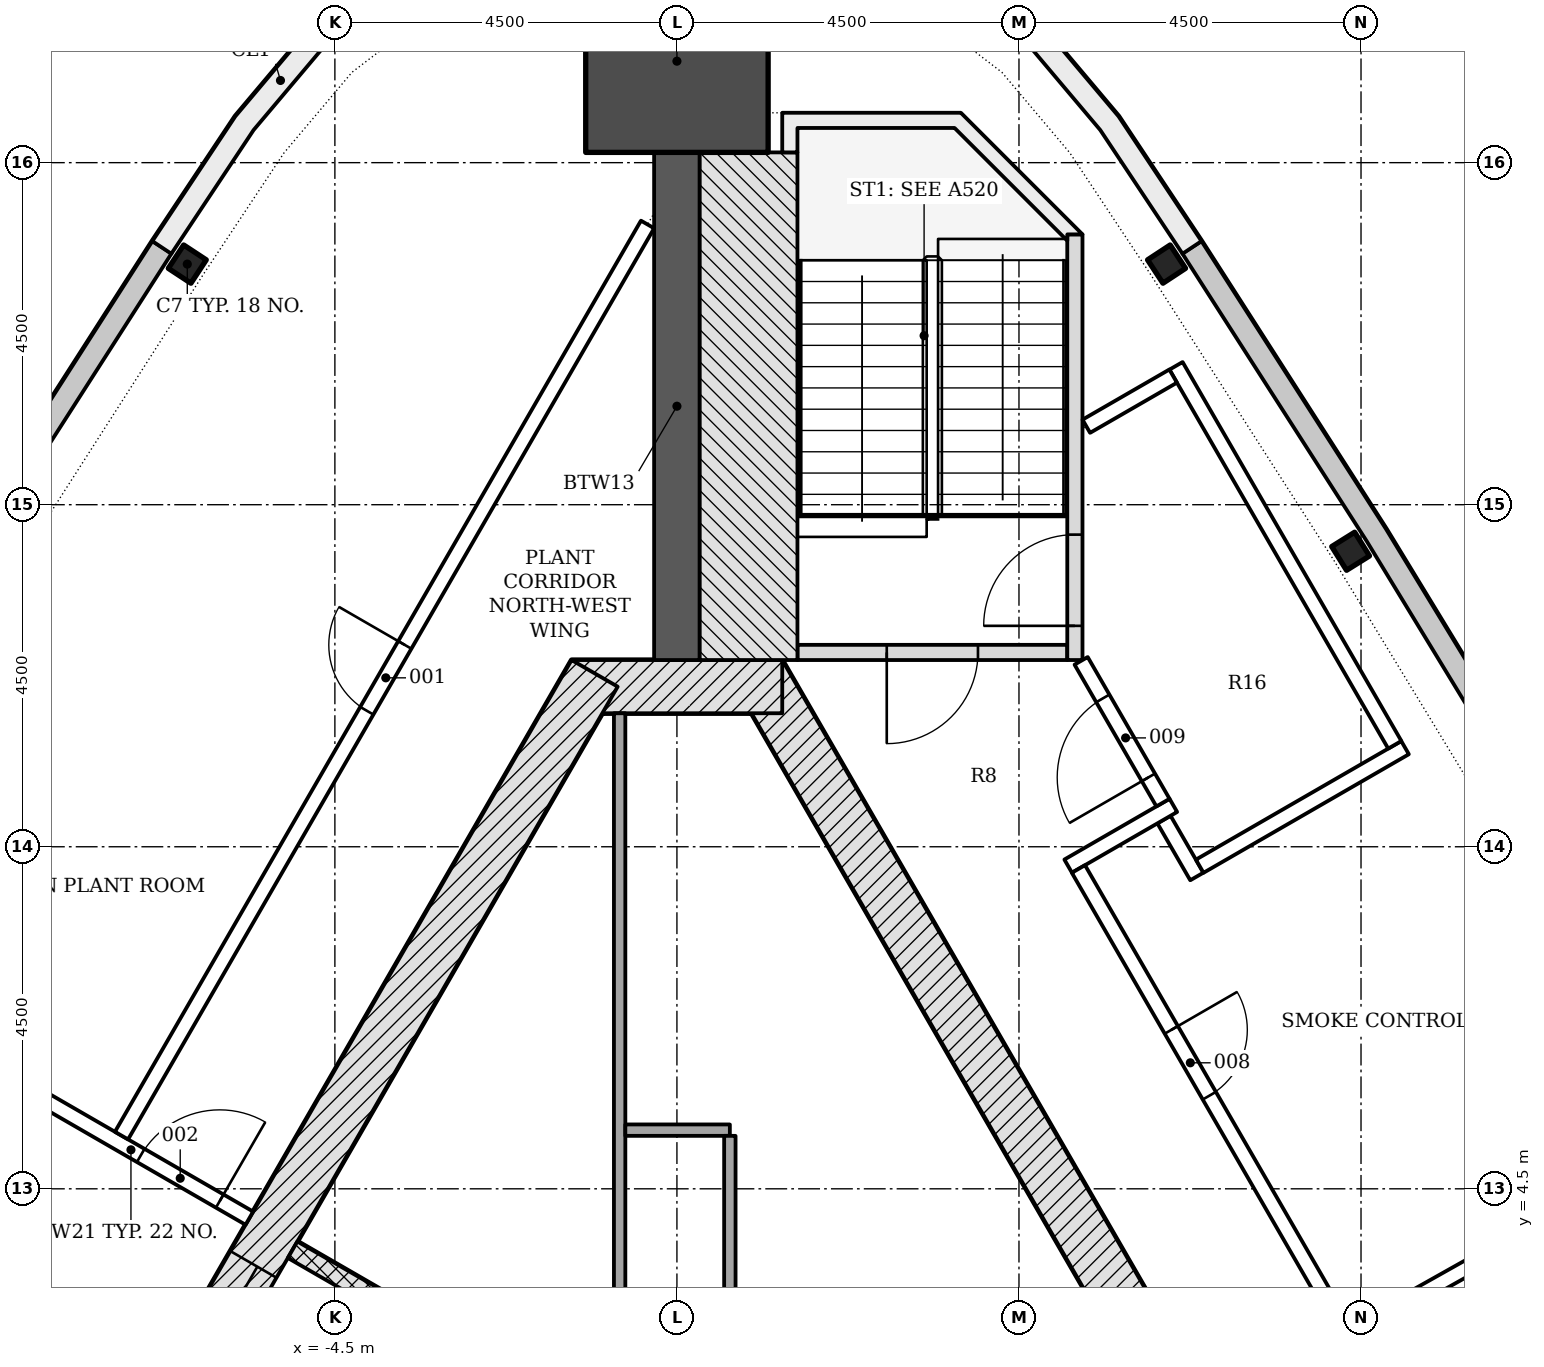
"""IFC4 building model, lengths in metres.
Left out: names, types, materials, properties, quantities, classifications, styles, units other than length and angle.
Written with IfcOpenShell. Run it as: python <this file> out.ifc"""

import sys

from ifc_helpers import new_model, si_unit, direction, frame, frame_2d, origin, origin_2d, place, context, subcontext, project, spatial, polyline, rectangle, i_section, outline, extrude, element, fill, save


model = new_model("IFC4")
c1 = context("Model", 3, precision=1e-05, world=origin(), true_north=direction((0.0, 1.0)))
c2 = subcontext(c1, "Body", "Model", "MODEL_VIEW")
j1 = project(units=[si_unit("LENGTHUNIT", "METRE"), si_unit("PLANEANGLEUNIT", "RADIAN")], contexts=[c1])
p1 = place(None, origin())
s1 = spatial("IfcSite", under=j1, at=p1, CompositionType="ELEMENT")
p2 = place(p1, origin())
s2 = spatial("IfcBuilding", under=s1, at=p2, CompositionType="ELEMENT")
p3 = place(p2, frame((0.0, 0.0, 297.6)))
s3 = spatial("IfcBuildingStorey", under=s2, at=p3, CompositionType="ELEMENT", Elevation=297.6)
p4 = place(p3, frame((10.311, -4.703, -0.25), z_axis=(0.0, 0.0, 1.0), x_axis=(-0.500001446645, 0.866024568562, 0.0)))
e1 = element("IfcWall", 1, at=p4, inside=s3, PredefinedType="SHEAR", context=c2, shape_type="SweptSolid", body=[
    extrude(rectangle(XDim=18.458, YDim=0.7, at=frame_2d((9.229, 0.0))), origin(), (0.0, 0.0, 1.0), 4.5),
])
p5 = place(p3, frame((1.386, 11.106, -0.25), z_axis=(0.0, 0.0, 1.0), x_axis=(-1.0, 0.0, 0.0)))
e2 = element("IfcWall", 2, at=p5, inside=s3, PredefinedType="SHEAR", context=c2, shape_type="SweptSolid", body=[
    extrude(rectangle(XDim=2.771, YDim=0.7, at=frame_2d((1.386, 0.0))), origin(), (0.0, 0.0, 1.0), 4.5),
])
p6 = place(p3, frame((-1.083, 11.281, -0.25), z_axis=(0.0, 0.0, 1.0), x_axis=(-0.500001446645, -0.866024568562, 0.0)))
e3 = element("IfcWall", 3, at=p6, inside=s3, PredefinedType="SHEAR", context=c2, shape_type="SweptSolid", body=[
    extrude(rectangle(XDim=18.458, YDim=0.7, at=frame_2d((9.229, 0.0))), origin(), (0.0, 0.0, 1.0), 4.5),
])
p7 = place(p6, frame((8.979, 0.0, 0.25)))
e4 = element("IfcOpeningElement", 4, at=p7, cuts=e3, PredefinedType="OPENING", context=c2, shape_type="SweptSolid", body=[
    extrude(rectangle(XDim=1.2, YDim=2.1, at=frame_2d((0.6, 1.05))), frame((0.0, 0.36, 0.0), z_axis=(0.0, -1.0, 0.0), x_axis=(1.0, 0.0, 0.0)), (0.0, 0.0, 1.0), 0.72),
])
p8 = place(p6, frame((11.029, 0.0, 0.25)))
e5 = element("IfcOpeningElement", 5, at=p8, cuts=e3, PredefinedType="OPENING", context=c2, shape_type="SweptSolid", body=[
    extrude(rectangle(XDim=1.2, YDim=2.1, at=frame_2d((0.6, 1.05))), frame((0.0, 0.36, 0.0), z_axis=(0.0, -1.0, 0.0), x_axis=(1.0, 0.0, 0.0)), (0.0, 0.0, 1.0), 0.72),
])
p9 = place(p3, frame((0.0, 11.456, -0.25), z_axis=(0.0, 0.0, 1.0), x_axis=(0.0, 1.0, 0.0)))
e6 = element("IfcWall", 6, at=p9, inside=s3, PredefinedType="SHEAR", context=c2, shape_type="SweptSolid", body=[
    extrude(rectangle(XDim=6.679, YDim=0.6, at=frame_2d((3.339, 0.0))), origin(), (0.0, 0.0, 1.0), 4.5),
])
p10 = place(p3, frame((0.0, 19.335, -0.25), z_axis=(0.0, 0.0, 1.0), x_axis=(0.0, 1.0, 0.0)))
e7 = element("IfcColumn", 7, at=p10, inside=s3, PredefinedType="COLUMN", context=c2, shape_type="SweptSolid", body=[
    extrude(rectangle(XDim=2.4, YDim=2.4, at=origin_2d()), origin(), (0.0, 0.0, 1.0), 4.5),
])
for number, where, z_axis, x_axis in (
    (8, (-6.442, 16.666, -0.25), (0.0, 0.0, 1.0), (-0.549, -0.836, 0.0)),
    (9, (8.863, 12.888, -0.25), (0.0, 0.0, 1.0), (-0.53, 0.848, 0.0)),
    (10, (6.442, 16.666, -0.25), (0.0, 0.0, 1.0), (-0.549, 0.836, 0.0)),
):
    element("IfcColumn", number, at=place(p3, frame(where, z_axis=z_axis, x_axis=x_axis)), inside=s3, PredefinedType="COLUMN", context=c2, shape_type="SweptSolid", body=[
        extrude(i_section(OverallWidth=0.368, OverallDepth=0.356, WebThickness=0.011, FlangeThickness=0.018, FilletRadius=0.015, at=origin_2d()), origin(), (0.0, 0.0, 1.0), 4.5),
    ])
p11 = place(p3, origin())
e11 = element("IfcWall", 11, at=p11, inside=s3, PredefinedType="NOTDEFINED", context=c2, shape_type="SweptSolid", body=[
    extrude(outline(polyline([(-6.901, 16.968), (-9.33, 13.179), (-11.669, 9.335), (-11.413, 9.179), (-9.075, 13.02), (-6.649, 16.806), (-6.901, 16.968)])), origin(), (0.0, 0.0, 1.0), 4.25),
])
p12 = place(p3, origin())
e12 = element("IfcWall", 12, at=p12, inside=s3, PredefinedType="NOTDEFINED", context=c2, shape_type="SweptSolid", body=[
    extrude(outline(polyline([(11.669, 9.335), (9.33, 13.179), (6.901, 16.968), (6.649, 16.806), (9.075, 13.02), (11.413, 9.179), (11.669, 9.335)])), origin(), (0.0, 0.0, 1.0), 4.25),
])
p13 = place(p3, origin())
e13 = element("IfcWall", 13, at=p13, inside=s3, PredefinedType="NOTDEFINED", context=c2, shape_type="SweptSolid", body=[
    extrude(outline(polyline([(6.901, 16.968), (5.81, 18.61), (4.83, 19.771), (3.623, 20.695), (2.244, 21.335), (0.76, 21.664), (-0.76, 21.664), (-2.244, 21.335), (-3.623, 20.695), (-4.83, 19.771), (-5.81, 18.61), (-6.901, 16.968), (-6.651, 16.802), (-5.569, 18.429), (-4.622, 19.553), (-3.466, 20.437), (-2.147, 21.05), (-0.727, 21.364), (0.727, 21.364), (2.147, 21.05), (3.466, 20.437), (4.622, 19.553), (5.569, 18.429), (6.651, 16.802), (6.901, 16.968)])), origin(), (0.0, 0.0, 1.0), 4.25),
])
p14 = place(p3, frame((-5.056, 3.699, -0.25), z_axis=(0.0, 0.0, 1.0), x_axis=(0.866032775405, -0.499987231761, 0.0)))
e14 = element("IfcWall", 14, at=p14, inside=s3, PredefinedType="PARTITIONING", context=c2, shape_type="SweptSolid", body=[
    extrude(rectangle(XDim=2.9, YDim=0.25, at=frame_2d((1.45, 0.0))), origin(), (0.0, 0.0, 1.0), 4.5),
])
p15 = place(p3, frame((-0.754, 10.756, 0.0), z_axis=(0.0, 0.0, 1.0), x_axis=(0.0, -1.0, 0.0)))
e15 = element("IfcWall", 15, at=p15, inside=s3, PredefinedType="PARTITIONING", context=c2, shape_type="SweptSolid", body=[
    extrude(rectangle(XDim=16.985, YDim=0.15, at=frame_2d((8.492, 0.0))), origin(), (0.0, 0.0, 1.0), 4.25),
])
p16 = place(p15, frame((9.185, 0.0, 0.0)))
e16 = element("IfcOpeningElement", 16, at=p16, cuts=e15, PredefinedType="OPENING", context=c2, shape_type="SweptSolid", body=[
    extrude(rectangle(XDim=0.9, YDim=2.1, at=frame_2d((0.45, 1.05))), frame((0.0, 0.085, 0.0), z_axis=(0.0, -1.0, 0.0), x_axis=(1.0, 0.0, 0.0)), (0.0, 0.0, 1.0), 0.17),
])
p17 = place(p3, frame((-0.679, 5.272, 0.0), z_axis=(0.0, 0.0, 1.0), x_axis=(1.0, 0.0, 0.0)))
e17 = element("IfcWall", 17, at=p17, inside=s3, PredefinedType="PARTITIONING", context=c2, shape_type="SweptSolid", body=[
    extrude(rectangle(XDim=1.375, YDim=0.15, at=frame_2d((0.688, 0.0))), origin(), (0.0, 0.0, 1.0), 4.25),
])
p18 = place(p3, frame((0.696, 5.197, 0.0), z_axis=(0.0, 0.0, 1.0), x_axis=(0.0, -1.0, 0.0)))
e18 = element("IfcWall", 18, at=p18, inside=s3, PredefinedType="PARTITIONING", context=c2, shape_type="SweptSolid", body=[
    extrude(rectangle(XDim=11.425, YDim=0.15, at=frame_2d((5.712, 0.0))), origin(), (0.0, 0.0, 1.0), 4.25),
])
p19 = place(p18, frame((3.664, 0.0, 0.0)))
e19 = element("IfcOpeningElement", 19, at=p19, cuts=e18, PredefinedType="OPENING", context=c2, shape_type="SweptSolid", body=[
    extrude(rectangle(XDim=0.9, YDim=2.1, at=frame_2d((0.45, 1.05))), frame((0.0, 0.085, 0.0), z_axis=(0.0, -1.0, 0.0), x_axis=(1.0, 0.0, 0.0)), (0.0, 0.0, 1.0), 0.17),
])
p20 = place(p3, frame((5.135, 11.556, -0.25), z_axis=(0.0, 0.0, 1.0), x_axis=(-1.0, 0.0, 0.0)))
e20 = element("IfcWall", 20, at=p20, inside=s3, PredefinedType="SHEAR", context=c2, shape_type="SweptSolid", body=[
    extrude(rectangle(XDim=3.55, YDim=0.2, at=frame_2d((1.775, 0.0))), origin(), (0.0, 0.0, 1.0), 4.5),
])
p21 = place(p20, frame((1.175, 0.0, 0.25)))
e21 = element("IfcOpeningElement", 21, at=p21, cuts=e20, PredefinedType="OPENING", context=c2, shape_type="SweptSolid", body=[
    extrude(rectangle(XDim=1.2, YDim=2.1, at=frame_2d((0.6, 1.05))), frame((0.0, 0.11, 0.0), z_axis=(0.0, -1.0, 0.0), x_axis=(1.0, 0.0, 0.0)), (0.0, 0.0, 1.0), 0.22),
])
p22 = place(p3, frame((5.236, 11.456, -0.25), z_axis=(0.0, 0.0, 1.0), x_axis=(0.0, 1.0, 0.0)))
e22 = element("IfcWall", 22, at=p22, inside=s3, PredefinedType="SHEAR", context=c2, shape_type="SweptSolid", body=[
    extrude(rectangle(XDim=5.6, YDim=0.2, at=frame_2d((2.8, 0.0))), origin(), (0.0, 0.0, 1.0), 4.5),
])
p23 = place(p22, frame((0.45, 0.0, 0.25)))
e23 = element("IfcOpeningElement", 23, at=p23, cuts=e22, PredefinedType="OPENING", context=c2, shape_type="SweptSolid", body=[
    extrude(rectangle(XDim=1.2, YDim=2.1, at=frame_2d((0.6, 1.05))), frame((0.0, 0.11, 0.0), z_axis=(0.0, -1.0, 0.0), x_axis=(1.0, 0.0, 0.0)), (0.0, 0.0, 1.0), 0.22),
])
p24 = place(p3, frame((0.943, 11.456, -0.25), z_axis=(0.0, 0.0, 1.0), x_axis=(0.0, 1.0, 0.0)))
e24 = element("IfcWall", 24, at=p24, inside=s3, PredefinedType="SHEAR", context=c2, shape_type="SweptSolid", body=[
    extrude(rectangle(XDim=6.679, YDim=1.286, at=frame_2d((3.339, 0.0))), origin(), (0.0, 0.0, 1.0), 4.5),
])
p25 = place(p3, frame((0.0, 0.0, -0.25)))
e25 = element("IfcWall", 25, at=p25, inside=s3, PredefinedType="SHEAR", context=c2, shape_type="SweptSolid", body=[
    extrude(outline(polyline([(5.336, 17.056), (3.736, 18.656), (1.385, 18.656), (1.385, 18.135), (1.586, 18.135), (1.586, 18.456), (3.653, 18.456), (5.135, 16.974), (5.135, 17.056), (5.135, 17.056), (5.135, 17.056), (5.135, 17.056), (5.135, 17.056), (5.135, 17.056), (5.135, 17.056), (5.135, 17.056), (5.135, 17.056), (5.135, 17.056), (5.135, 17.056), (5.135, 17.056), (5.135, 17.056), (5.135, 17.056), (5.135, 17.056), (5.135, 17.056), (5.135, 17.056), (5.336, 17.056)])), origin(), (0.0, 0.0, 1.0), 4.5),
])
p26 = place(p3, frame((-8.741, 5.913, 0.0), z_axis=(0.0, 0.0, 1.0), x_axis=(0.866017220491, -0.500014173611, 0.0)))
e26 = element("IfcWall", 26, at=p26, inside=s3, PredefinedType="PARTITIONING", context=c2, shape_type="SweptSolid", body=[
    extrude(rectangle(XDim=3.598, YDim=0.2, at=frame_2d((1.799, 0.0))), origin(), (0.0, 0.0, 1.0), 4.25),
])
p27 = place(p26, frame((1.948, 0.0, 0.0)))
e27 = element("IfcOpeningElement", 27, at=p27, cuts=e26, PredefinedType="OPENING", context=c2, shape_type="SweptSolid", body=[
    extrude(rectangle(XDim=1.2, YDim=2.1, at=frame_2d((0.6, 1.05))), frame((0.0, 0.11, 0.0), z_axis=(0.0, -1.0, 0.0), x_axis=(1.0, 0.0, 0.0)), (0.0, 0.0, 1.0), 0.22),
])
p28 = place(p3, frame((-7.307, 5.2, 0.0), z_axis=(0.0, 0.0, 1.0), x_axis=(0.49999780173, 0.866026672953, 0.0)))
e28 = element("IfcWall", 28, at=p28, inside=s3, PredefinedType="PARTITIONING", context=c2, shape_type="SweptSolid", body=[
    extrude(rectangle(XDim=13.841, YDim=0.2, at=frame_2d((6.92, 0.0))), origin(), (0.0, 0.0, 1.0), 3.702),
])
p29 = place(p28, frame((6.454, 0.0, 0.0)))
e29 = element("IfcOpeningElement", 29, at=p29, cuts=e28, PredefinedType="OPENING", context=c2, shape_type="SweptSolid", body=[
    extrude(rectangle(XDim=1.0, YDim=2.1, at=frame_2d((0.5, 1.05))), frame((0.0, 0.11, 0.0), z_axis=(0.0, -1.0, 0.0), x_axis=(1.0, 0.0, 0.0)), (0.0, 0.0, 1.0), 0.22),
])
p30 = place(p3, frame((6.408, 9.358, 0.0), z_axis=(0.0, 0.0, 1.0), x_axis=(0.49996696679, -0.866044474677, 0.0)))
e30 = element("IfcWall", 30, at=p30, inside=s3, PredefinedType="PARTITIONING", context=c2, shape_type="SweptSolid", body=[
    extrude(rectangle(XDim=0.864, YDim=0.2, at=frame_2d((0.432, 0.0))), origin(), (0.0, 0.0, 1.0), 4.25),
])
p31 = place(p3, frame((5.147, 8.745, 0.0), z_axis=(0.0, 0.0, 1.0), x_axis=(0.865987117328, 0.500066308224, 0.0)))
e31 = element("IfcWall", 31, at=p31, inside=s3, PredefinedType="PARTITIONING", context=c2, shape_type="SweptSolid", body=[
    extrude(rectangle(XDim=1.598, YDim=0.2, at=frame_2d((0.799, 0.0))), origin(), (0.0, 0.0, 1.0), 4.25),
])
p32 = place(p3, frame((6.395, 9.581, 0.0), z_axis=(0.0, 0.0, 1.0), x_axis=(-0.500003735859, 0.866023246874, 0.0)))
e32 = element("IfcWall", 32, at=p32, inside=s3, PredefinedType="PARTITIONING", context=c2, shape_type="SweptSolid", body=[
    extrude(rectangle(XDim=2.154, YDim=0.2, at=frame_2d((1.077, 0.0))), origin(), (0.0, 0.0, 1.0), 3.702),
])
p33 = place(p32, frame((0.383, 0.0, 0.0)))
e33 = element("IfcOpeningElement", 33, at=p33, cuts=e32, PredefinedType="OPENING", context=c2, shape_type="SweptSolid", body=[
    extrude(rectangle(XDim=1.2, YDim=2.1, at=frame_2d((0.6, 1.05))), frame((0.0, 0.11, 0.0), z_axis=(0.0, -1.0, 0.0), x_axis=(1.0, 0.0, 0.0)), (0.0, 0.0, 1.0), 0.22),
])
p34 = place(p3, frame((5.282, 8.708, 0.0), z_axis=(0.0, 0.0, 1.0), x_axis=(0.500001848211, -0.866024336717, 0.0)))
e34 = element("IfcWall", 34, at=p34, inside=s3, PredefinedType="PARTITIONING", context=c2, shape_type="SweptSolid", body=[
    extrude(rectangle(XDim=19.591, YDim=0.2, at=frame_2d((9.795, 0.0))), origin(), (0.0, 0.0, 1.0), 3.702),
])
p35 = place(p34, frame((12.923, 0.0, 0.0)))
e35 = element("IfcOpeningElement", 35, at=p35, cuts=e34, PredefinedType="OPENING", context=c2, shape_type="SweptSolid", body=[
    extrude(rectangle(XDim=1.0, YDim=2.1, at=frame_2d((0.5, 1.05))), frame((0.0, 0.11, 0.0), z_axis=(0.0, -1.0, 0.0), x_axis=(1.0, 0.0, 0.0)), (0.0, 0.0, 1.0), 0.22),
])
p36 = place(p34, frame((2.444, 0.0, 0.0)))
e36 = element("IfcOpeningElement", 36, at=p36, cuts=e34, PredefinedType="OPENING", context=c2, shape_type="SweptSolid", body=[
    extrude(rectangle(XDim=1.0, YDim=2.1, at=frame_2d((0.5, 1.05))), frame((0.0, 0.11, 0.0), z_axis=(0.0, -1.0, 0.0), x_axis=(1.0, 0.0, 0.0)), (0.0, 0.0, 1.0), 0.22),
])
p37 = place(p3, frame((8.911, 2.624, 0.0), z_axis=(0.0, 0.0, 1.0), x_axis=(0.871756434121, 0.48993950603, 0.0)))
e37 = element("IfcWall", 37, at=p37, inside=s3, PredefinedType="PARTITIONING", context=c2, shape_type="SweptSolid", body=[
    extrude(rectangle(XDim=5.044, YDim=0.2, at=frame_2d((2.522, 0.0))), origin(), (0.0, 0.0, 1.0), 3.702),
])
p38 = place(p3, frame((6.878, 8.744, 0.0), z_axis=(0.0, 0.0, 1.0), x_axis=(0.866023983177, 0.500002460556, 0.0)))
e38 = element("IfcWall", 38, at=p38, inside=s3, PredefinedType="PARTITIONING", context=c2, shape_type="SweptSolid", body=[
    extrude(rectangle(XDim=3.12, YDim=0.2, at=frame_2d((1.56, 0.0))), origin(), (0.0, 0.0, 1.0), 4.25),
])
p39 = place(p3, frame((6.566, 15.327, 0.0), z_axis=(0.0, 0.0, 1.0), x_axis=(0.499997778408, -0.866026686418, 0.0)))
e39 = element("IfcWall", 39, at=p39, inside=s3, PredefinedType="PARTITIONING", context=c2, shape_type="SweptSolid", body=[
    extrude(rectangle(XDim=5.757, YDim=0.2, at=frame_2d((2.878, 0.0))), origin(), (0.0, 0.0, 1.0), 3.702),
])
p40 = place(p3, frame((6.529, 15.192, 0.0), z_axis=(0.0, 0.0, 1.0), x_axis=(-0.866117824122, -0.499839889103, 0.0)))
e40 = element("IfcWall", 40, at=p40, inside=s3, PredefinedType="PARTITIONING", context=c2, shape_type="SweptSolid", body=[
    extrude(rectangle(XDim=1.32, YDim=0.2, at=frame_2d((0.66, 0.0))), origin(), (0.0, 0.0, 1.0), 4.25),
])
p41 = place(p7, origin())
e41 = element("IfcDoor", 41, at=p41, inside=s3, OperationType="DOUBLE_DOOR_SLIDING", PredefinedType="DOOR", context=c2, shape_type="SweptSolid", body=[
    extrude(rectangle(XDim=1.2, YDim=2.1, at=frame_2d((0.6, 1.05))), frame((0.0, 0.025, 0.0), z_axis=(0.0, -1.0, 0.0), x_axis=(1.0, 0.0, 0.0)), (0.0, 0.0, 1.0), 0.05),
])
fill(e4, e41)
p42 = place(p21, origin())
e42 = element("IfcDoor", 42, at=p42, inside=s3, OperationType="SINGLE_SWING_RIGHT", PredefinedType="DOOR", context=c2, shape_type="SweptSolid", body=[
    extrude(rectangle(XDim=1.2, YDim=2.1, at=frame_2d((0.6, 1.05))), frame((0.0, 0.025, 0.0), z_axis=(0.0, -1.0, 0.0), x_axis=(1.0, 0.0, 0.0)), (0.0, 0.0, 1.0), 0.05),
])
fill(e21, e42)
p43 = place(p23, origin())
e43 = element("IfcDoor", 43, at=p43, inside=s3, OperationType="SINGLE_SWING_LEFT", PredefinedType="DOOR", context=c2, shape_type="SweptSolid", body=[
    extrude(rectangle(XDim=1.2, YDim=2.1, at=frame_2d((0.6, 1.05))), frame((0.0, 0.025, 0.0), z_axis=(0.0, -1.0, 0.0), x_axis=(1.0, 0.0, 0.0)), (0.0, 0.0, 1.0), 0.05),
])
fill(e23, e43)
p44 = place(p29, origin())
e44 = element("IfcDoor", 44, at=p44, inside=s3, OperationType="SINGLE_SWING_RIGHT", PredefinedType="DOOR", context=c2, shape_type="SweptSolid", body=[
    extrude(rectangle(XDim=1.0, YDim=2.1, at=frame_2d((0.5, 1.05))), frame((0.0, 0.025, 0.0), z_axis=(0.0, -1.0, 0.0), x_axis=(1.0, 0.0, 0.0)), (0.0, 0.0, 1.0), 0.05),
])
fill(e29, e44)
p45 = place(p27, origin())
e45 = element("IfcDoor", 45, at=p45, inside=s3, OperationType="SINGLE_SWING_RIGHT", PredefinedType="DOOR", context=c2, shape_type="SweptSolid", body=[
    extrude(rectangle(XDim=1.2, YDim=2.1, at=frame_2d((0.6, 1.05))), frame((0.0, 0.025, 0.0), z_axis=(0.0, -1.0, 0.0), x_axis=(1.0, 0.0, 0.0)), (0.0, 0.0, 1.0), 0.05),
])
fill(e27, e45)
p46 = place(p36, origin())
e46 = element("IfcDoor", 46, at=p46, inside=s3, OperationType="SINGLE_SWING_LEFT", PredefinedType="DOOR", context=c2, shape_type="SweptSolid", body=[
    extrude(rectangle(XDim=1.0, YDim=2.1, at=frame_2d((0.5, 1.05))), frame((0.0, 0.025, 0.0), z_axis=(0.0, -1.0, 0.0), x_axis=(1.0, 0.0, 0.0)), (0.0, 0.0, 1.0), 0.05),
])
fill(e36, e46)
p47 = place(p33, origin())
e47 = element("IfcDoor", 47, at=p47, inside=s3, OperationType="SINGLE_SWING_LEFT", PredefinedType="DOOR", context=c2, shape_type="SweptSolid", body=[
    extrude(rectangle(XDim=1.2, YDim=2.1, at=frame_2d((0.6, 1.05))), frame((0.0, 0.025, 0.0), z_axis=(0.0, -1.0, 0.0), x_axis=(1.0, 0.0, 0.0)), (0.0, 0.0, 1.0), 0.05),
])
fill(e33, e47)
save(model, sys.argv[1])
